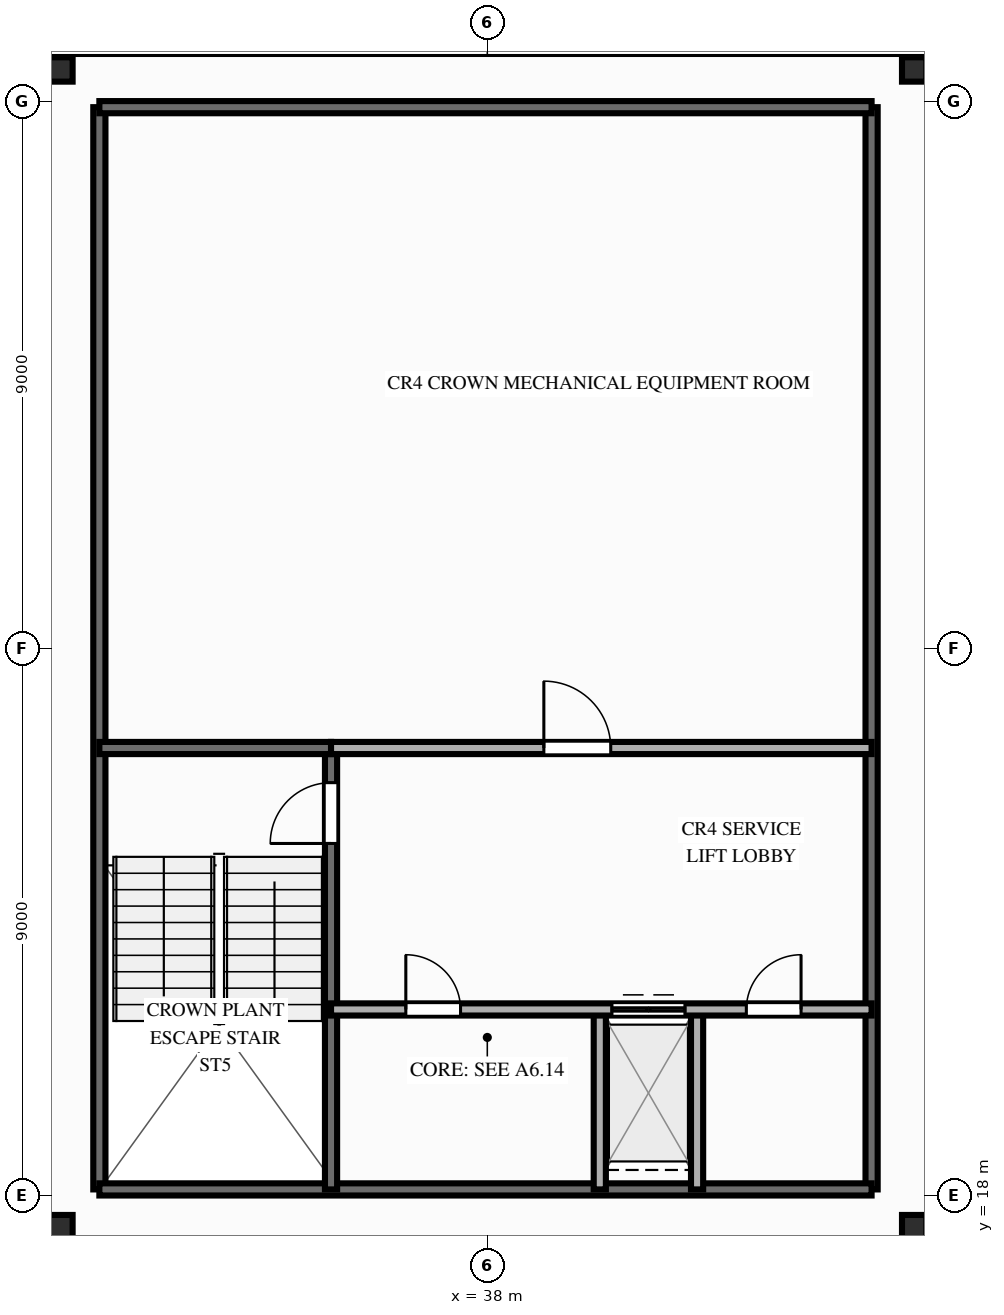
"""IFC4 building model, lengths in metres.
Left out: names, types, materials, properties, quantities, classifications, styles, units other than length and angle.
Written with IfcOpenShell. Run it as: python <this file> out.ifc"""

import sys

from ifc_helpers import new_model, si_unit, direction, frame, frame_2d, origin, origin_2d, place, context, subcontext, project, spatial, rectangle, i_section, extrude, source, transform, mapped, element, fill, save


model = new_model("IFC4")
c1 = context("Model", 3, precision=1e-05, world=origin(), true_north=direction((0.0, 1.0)))
c2 = subcontext(c1, "Body", "Model", "MODEL_VIEW")
j1 = project(units=[si_unit("LENGTHUNIT", "METRE"), si_unit("PLANEANGLEUNIT", "RADIAN")], contexts=[c1])
p1 = place(None, origin())
s1 = spatial("IfcSite", under=j1, at=p1, CompositionType="ELEMENT")
p2 = place(p1, origin())
s2 = spatial("IfcBuilding", under=s1, at=p2, CompositionType="ELEMENT")
p3 = place(p2, frame((0.0, 0.0, 263.6)))
s3 = spatial("IfcBuildingStorey", under=s2, at=p3, CompositionType="ELEMENT", Elevation=263.6)
m1 = source(origin(), c2, "Body", "SweptSolid", [
    extrude(i_section(OverallWidth=0.4, OverallDepth=0.4, WebThickness=0.013, FlangeThickness=0.021, at=origin_2d()), origin(), (0.0, 0.0, 1.0), 3.8),
])
for number, where, z_axis, x_axis in (
    (1, (30.98, 17.48, 0.0), (0.0, 0.0, 1.0), (1.0, 0.0, 0.0)),
    (2, (45.02, 17.48, 0.0), (0.0, 0.0, 1.0), (1.0, 0.0, 0.0)),
    (3, (30.98, 36.52, 0.0), (0.0, 0.0, 1.0), (1.0, 0.0, 0.0)),
    (4, (45.02, 36.52, 0.0), (0.0, 0.0, 1.0), (1.0, 0.0, 0.0)),
):
    element("IfcColumn", number, at=place(p3, frame(where, z_axis=z_axis, x_axis=x_axis)), inside=s3, PredefinedType="COLUMN", context=c2, shape_type="MappedRepresentation", body=[
        mapped(m1, transform((0.0, 0.0, 0.0), scale=1.0)),
    ])
for number, where, z_axis, x_axis in (
    (5, (31.62, 18.1, 0.0), (0.0, 0.0, 1.0), (0.0, 1.0, 0.0)),
    (6, (44.32, 18.1, 0.0), (0.0, 0.0, 1.0), (0.0, 1.0, 0.0)),
):
    element("IfcWall", number, at=place(p3, frame(where, z_axis=z_axis, x_axis=x_axis)), inside=s3, PredefinedType="SOLIDWALL", context=c2, shape_type="SweptSolid", body=[
        extrude(rectangle(XDim=17.8, YDim=0.2, at=frame_2d((8.9, 0.0))), origin(), (0.0, 0.0, 1.0), 3.55),
    ])
for number, where, z_axis, x_axis in (
    (7, (31.62, 18.1, 0.0), (0.0, 0.0, 1.0), (1.0, 0.0, 0.0)),
    (8, (31.62, 35.9, 0.0), (0.0, 0.0, 1.0), (1.0, 0.0, 0.0)),
):
    element("IfcWall", number, at=place(p3, frame(where, z_axis=z_axis, x_axis=x_axis)), inside=s3, PredefinedType="SOLIDWALL", context=c2, shape_type="SweptSolid", body=[
        extrude(rectangle(XDim=12.7, YDim=0.2, at=frame_2d((6.35, 0.0))), origin(), (0.0, 0.0, 1.0), 3.55),
    ])
p4 = place(p3, frame((35.43, 18.1, 0.0), z_axis=(0.0, 0.0, 1.0), x_axis=(0.0, 1.0, 0.0)))
e9 = element("IfcWall", 9, at=p4, inside=s3, PredefinedType="SOLIDWALL", context=c2, shape_type="SweptSolid", body=[
    extrude(rectangle(XDim=7.26, YDim=0.2, at=frame_2d((3.63, 0.0))), origin(), (0.0, 0.0, 1.0), 3.55),
])
p5 = place(p4, frame((6.69, 0.0, 0.0), z_axis=(0.0, 0.0, 1.0), x_axis=(-1.0, 0.0, 0.0)))
e10 = element("IfcOpeningElement", 10, at=p5, cuts=e9, PredefinedType="OPENING", context=c2, shape_type="SweptSolid", body=[
    extrude(rectangle(XDim=1.0, YDim=2.15, at=frame_2d((0.5, 1.075))), frame((0.0, 0.112, 0.0), z_axis=(0.0, -1.0, 0.0), x_axis=(1.0, 0.0, 0.0)), (0.0, 0.0, 1.0), 0.224),
])
p6 = place(p3, frame((31.62, 25.36, 0.0), z_axis=(0.0, 0.0, 1.0), x_axis=(1.0, 0.0, 0.0)))
e11 = element("IfcWall", 11, at=p6, inside=s3, PredefinedType="SOLIDWALL", context=c2, shape_type="SweptSolid", body=[
    extrude(rectangle(XDim=3.81, YDim=0.2, at=frame_2d((1.905, 0.0))), origin(), (0.0, 0.0, 1.0), 3.55),
])
for number, where, z_axis, x_axis in (
    (12, (39.85, 18.1, 0.0), (0.0, 0.0, 1.0), (0.0, 1.0, 0.0)),
    (13, (41.45, 18.1, 0.0), (0.0, 0.0, 1.0), (0.0, 1.0, 0.0)),
):
    element("IfcWall", number, at=place(p3, frame(where, z_axis=z_axis, x_axis=x_axis)), inside=s3, PredefinedType="PARTITIONING", context=c2, shape_type="SweptSolid", body=[
        extrude(rectangle(XDim=2.96, YDim=0.2, at=frame_2d((1.48, 0.0))), origin(), (0.0, 0.0, 1.0), 3.55),
    ])
p7 = place(p3, frame((35.43, 21.06, 0.0), z_axis=(0.0, 0.0, 1.0), x_axis=(1.0, 0.0, 0.0)))
e14 = element("IfcWall", 14, at=p7, inside=s3, PredefinedType="PARTITIONING", context=c2, shape_type="SweptSolid", body=[
    extrude(rectangle(XDim=8.89, YDim=0.2, at=frame_2d((4.445, 0.0))), origin(), (0.0, 0.0, 1.0), 3.55),
])
p8 = place(p7, frame((1.23, 0.0, 0.0)))
e15 = element("IfcOpeningElement", 15, at=p8, cuts=e14, PredefinedType="OPENING", context=c2, shape_type="SweptSolid", body=[
    extrude(rectangle(XDim=0.9, YDim=2.1, at=frame_2d((0.45, 1.05))), frame((0.0, 0.112, 0.0), z_axis=(0.0, -1.0, 0.0), x_axis=(1.0, 0.0, 0.0)), (0.0, 0.0, 1.0), 0.224),
])
p9 = place(p7, frame((4.62, 0.0, 0.0)))
e16 = element("IfcOpeningElement", 16, at=p9, cuts=e14, PredefinedType="OPENING", context=c2, shape_type="SweptSolid", body=[
    extrude(rectangle(XDim=1.2, YDim=2.15, at=frame_2d((0.6, 1.075))), frame((0.0, 0.112, 0.0), z_axis=(0.0, -1.0, 0.0), x_axis=(1.0, 0.0, 0.0)), (0.0, 0.0, 1.0), 0.224),
])
p10 = place(p7, frame((6.83, 0.0, 0.0)))
e17 = element("IfcOpeningElement", 17, at=p10, cuts=e14, PredefinedType="OPENING", context=c2, shape_type="SweptSolid", body=[
    extrude(rectangle(XDim=0.9, YDim=2.1, at=frame_2d((0.45, 1.05))), frame((0.0, 0.112, 0.0), z_axis=(0.0, -1.0, 0.0), x_axis=(1.0, 0.0, 0.0)), (0.0, 0.0, 1.0), 0.224),
])
p11 = place(p3, frame((35.43, 25.36, 0.0), z_axis=(0.0, 0.0, 1.0), x_axis=(1.0, 0.0, 0.0)))
e18 = element("IfcWall", 18, at=p11, inside=s3, PredefinedType="PARTITIONING", context=c2, shape_type="SweptSolid", body=[
    extrude(rectangle(XDim=8.89, YDim=0.2, at=frame_2d((4.445, 0.0))), origin(), (0.0, 0.0, 1.0), 2.952),
])
p12 = place(p11, frame((3.5, 0.0, 0.0)))
e19 = element("IfcOpeningElement", 19, at=p12, cuts=e18, PredefinedType="OPENING", context=c2, shape_type="SweptSolid", body=[
    extrude(rectangle(XDim=1.1, YDim=2.15, at=frame_2d((0.55, 1.075))), frame((0.0, 0.112, 0.0), z_axis=(0.0, -1.0, 0.0), x_axis=(1.0, 0.0, 0.0)), (0.0, 0.0, 1.0), 0.224),
])
m2 = source(origin(), c2, "Body", "SweptSolid", [
    extrude(rectangle(XDim=1.0, YDim=2.15, at=frame_2d((0.5, 1.075))), frame((0.0, 0.025, 0.0), z_axis=(0.0, -1.0, 0.0), x_axis=(1.0, 0.0, 0.0)), (0.0, 0.0, 1.0), 0.05),
])
p13 = place(p5, origin())
e20 = element("IfcDoor", 20, at=p13, inside=s3, OperationType="SINGLE_SWING_RIGHT", PredefinedType="DOOR", context=c2, shape_type="MappedRepresentation", body=[
    mapped(m2, transform((0.0, 0.0, 0.0), scale=1.0)),
])
fill(e10, e20)
m3 = source(origin(), c2, "Body", "SweptSolid", [
    extrude(rectangle(XDim=0.9, YDim=2.1, at=frame_2d((0.45, 1.05))), frame((0.0, 0.025, 0.0), z_axis=(0.0, -1.0, 0.0), x_axis=(1.0, 0.0, 0.0)), (0.0, 0.0, 1.0), 0.05),
])
p14 = place(p8, origin())
e21 = element("IfcDoor", 21, at=p14, inside=s3, OperationType="SINGLE_SWING_LEFT", PredefinedType="DOOR", context=c2, shape_type="MappedRepresentation", body=[
    mapped(m3, transform((0.0, 0.0, 0.0), scale=1.0)),
])
fill(e15, e21)
m4 = source(origin(), c2, "Body", "SweptSolid", [
    extrude(rectangle(XDim=1.2, YDim=2.15, at=frame_2d((0.6, 1.075))), frame((0.0, 0.025, 0.0), z_axis=(0.0, -1.0, 0.0), x_axis=(1.0, 0.0, 0.0)), (0.0, 0.0, 1.0), 0.05),
])
p15 = place(p9, origin())
e22 = element("IfcDoor", 22, at=p15, inside=s3, OperationType="DOUBLE_DOOR_SLIDING", PredefinedType="DOOR", context=c2, shape_type="MappedRepresentation", body=[
    mapped(m4, transform((0.0, 0.0, 0.0), scale=1.0)),
])
fill(e16, e22)
p16 = place(p10, origin())
e23 = element("IfcDoor", 23, at=p16, inside=s3, OperationType="SINGLE_SWING_RIGHT", PredefinedType="DOOR", context=c2, shape_type="MappedRepresentation", body=[
    mapped(m3, transform((0.0, 0.0, 0.0), scale=1.0)),
])
fill(e17, e23)
m5 = source(origin(), c2, "Body", "SweptSolid", [
    extrude(rectangle(XDim=1.1, YDim=2.15, at=frame_2d((0.55, 1.075))), frame((0.0, 0.025, 0.0), z_axis=(0.0, -1.0, 0.0), x_axis=(1.0, 0.0, 0.0)), (0.0, 0.0, 1.0), 0.05),
])
p17 = place(p12, origin())
e24 = element("IfcDoor", 24, at=p17, inside=s3, OperationType="SINGLE_SWING_LEFT", PredefinedType="DOOR", context=c2, shape_type="MappedRepresentation", body=[
    mapped(m5, transform((0.0, 0.0, 0.0), scale=1.0)),
])
fill(e19, e24)
save(model, sys.argv[1])
